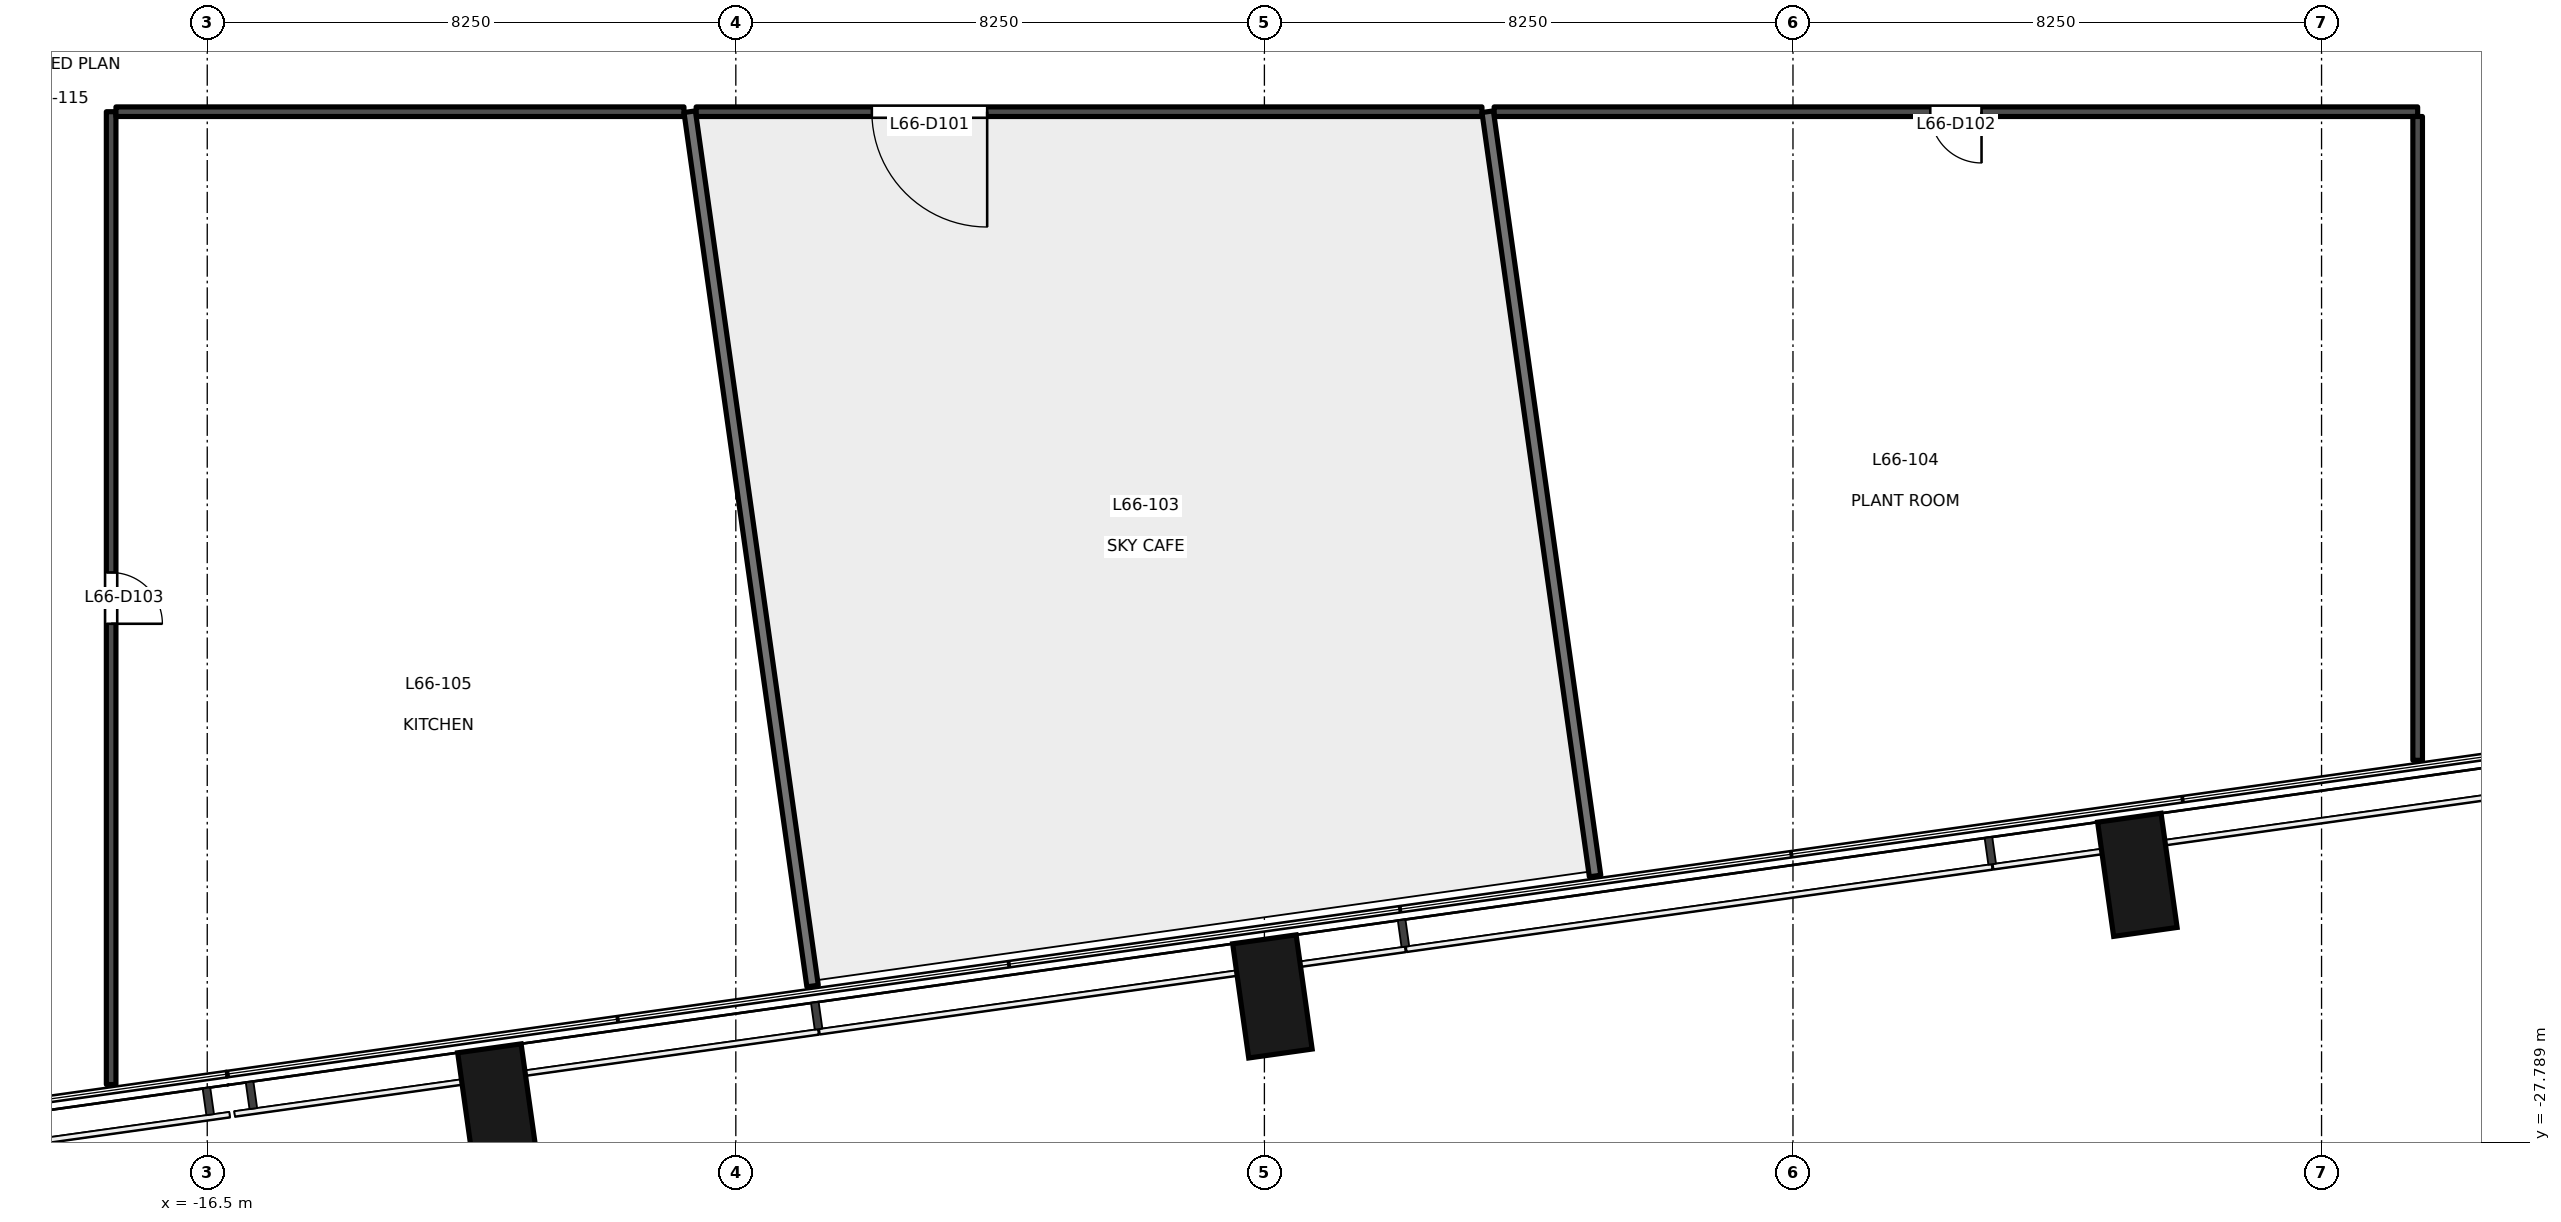
"""IFC4 building model, lengths in metres.
Left out: names, types, materials, properties, quantities, classifications, styles, units other than length and angle.
Written with IfcOpenShell. Run it as: python <this file> out.ifc"""

import sys

from ifc_helpers import new_model, si_unit, direction, frame, frame_2d, origin, origin_2d, place, context, subcontext, project, spatial, rectangle, extrude, element, fill, save


model = new_model("IFC4")
c1 = context("Model", 3, precision=1e-05, world=origin(), true_north=direction((0.0, 1.0)))
c2 = subcontext(c1, "Body", "Model", "MODEL_VIEW")
j1 = project(units=[si_unit("LENGTHUNIT", "METRE"), si_unit("PLANEANGLEUNIT", "RADIAN")], contexts=[c1])
p1 = place(None, origin())
s1 = spatial("IfcSite", under=j1, at=p1, CompositionType="ELEMENT")
p2 = place(p1, origin())
s2 = spatial("IfcBuilding", under=s1, at=p2, CompositionType="ELEMENT")
p3 = place(p2, frame((0.0, 0.0, 286.3)))
s3 = spatial("IfcBuildingStorey", under=s2, at=p3, CompositionType="ELEMENT", Elevation=286.3)
for number, where, z_axis, x_axis in (
    (1, (-11.971, -27.209, -0.2), (0.0, 0.0, 1.0), (0.99, 0.139, 0.0)),
    (2, (0.125, -25.508, -0.2), (0.0, 0.0, 1.0), (0.99, 0.139, 0.0)),
    (3, (13.625, -23.61, -0.2), (0.0, 0.0, 1.0), (0.99, 0.139, 0.0)),
):
    element("IfcColumn", number, at=place(p3, frame(where, z_axis=z_axis, x_axis=x_axis)), inside=s3, PredefinedType="COLUMN", context=c2, shape_type="SweptSolid", body=[
        extrude(rectangle(XDim=1.0, YDim=1.8, at=origin_2d()), origin(), (0.0, 0.0, 1.0), 6.0),
    ])
p4 = place(p3, frame((3.396, -11.7, 0.0), z_axis=(0.0, 0.0, 1.0), x_axis=(-1.0, 0.0, 0.0)))
e4 = element("IfcWall", 4, at=p4, inside=s3, PredefinedType="PARTITIONING", context=c2, shape_type="SweptSolid", body=[
    extrude(rectangle(XDim=12.265, YDim=0.15, at=frame_2d((6.132, 0.0))), origin(), (0.0, 0.0, 1.0), 3.75),
])
p5 = place(p4, frame((7.723, 0.0, 0.0)))
e5 = element("IfcOpeningElement", 5, at=p5, cuts=e4, PredefinedType="OPENING", context=c2, shape_type="SweptSolid", body=[
    extrude(rectangle(XDim=1.8, YDim=2.1, at=frame_2d((0.9, 1.05))), frame((0.0, 0.085, 0.0), z_axis=(0.0, -1.0, 0.0), x_axis=(1.0, 0.0, 0.0)), (0.0, 0.0, 1.0), 0.171),
])
p6 = place(p3, frame((18.0, -11.7, 0.0), z_axis=(0.0, 0.0, 1.0), x_axis=(-1.0, 0.0, 0.0)))
e6 = element("IfcWall", 6, at=p6, inside=s3, PredefinedType="PARTITIONING", context=c2, shape_type="SweptSolid", body=[
    extrude(rectangle(XDim=14.414, YDim=0.15, at=frame_2d((7.207, 0.0))), origin(), (0.0, 0.0, 1.0), 3.75),
])
p7 = place(p6, frame((6.807, 0.0, 0.0)))
e7 = element("IfcOpeningElement", 7, at=p7, cuts=e6, PredefinedType="OPENING", context=c2, shape_type="SweptSolid", body=[
    extrude(rectangle(XDim=0.8, YDim=2.1, at=frame_2d((0.4, 1.05))), frame((0.0, 0.085, 0.0), z_axis=(0.0, -1.0, 0.0), x_axis=(1.0, 0.0, 0.0)), (0.0, 0.0, 1.0), 0.171),
])
p8 = place(p3, frame((18.0, -21.823, 0.0), z_axis=(0.0, 0.0, 1.0), x_axis=(0.0, 1.0, 0.0)))
e8 = element("IfcWall", 8, at=p8, inside=s3, PredefinedType="PARTITIONING", context=c2, shape_type="SweptSolid", body=[
    extrude(rectangle(XDim=10.048, YDim=0.15, at=frame_2d((5.024, 0.0))), origin(), (0.0, 0.0, 1.0), 5.8),
])
p9 = place(p3, frame((-18.0, -11.7, 0.0), z_axis=(0.0, 0.0, 1.0), x_axis=(0.0, -1.0, 0.0)))
e9 = element("IfcWall", 9, at=p9, inside=s3, PredefinedType="PARTITIONING", context=c2, shape_type="SweptSolid", body=[
    extrude(rectangle(XDim=15.183, YDim=0.15, at=frame_2d((7.592, 0.0))), origin(), (0.0, 0.0, 1.0), 3.75),
])
p10 = place(p9, frame((7.192, 0.0, 0.0)))
e10 = element("IfcOpeningElement", 10, at=p10, cuts=e9, PredefinedType="OPENING", context=c2, shape_type="SweptSolid", body=[
    extrude(rectangle(XDim=0.8, YDim=2.1, at=frame_2d((0.4, 1.05))), frame((0.0, 0.085, 0.0), z_axis=(0.0, -1.0, 0.0), x_axis=(1.0, 0.0, 0.0)), (0.0, 0.0, 1.0), 0.171),
])
p11 = place(p3, frame((-9.059, -11.7, 0.0), z_axis=(0.0, 0.0, 1.0), x_axis=(-1.0, 0.0, 0.0)))
e11 = element("IfcWall", 11, at=p11, inside=s3, PredefinedType="PARTITIONING", context=c2, shape_type="SweptSolid", body=[
    extrude(rectangle(XDim=8.866, YDim=0.15, at=frame_2d((4.433, 0.0))), origin(), (0.0, 0.0, 1.0), 3.75),
])
p12 = place(p3, frame((3.485, -11.7, 0.0), z_axis=(0.0, 0.0, 1.0), x_axis=(0.139114157963, -0.990276350851, 0.0)))
e12 = element("IfcWall", 12, at=p12, inside=s3, PredefinedType="PARTITIONING", context=c2, shape_type="SweptSolid", body=[
    extrude(rectangle(XDim=12.046, YDim=0.18, at=frame_2d((6.023, 0.0))), origin(), (0.0, 0.0, 1.0), 4.7),
])
p13 = place(p3, frame((-7.052, -25.346, 0.0), z_axis=(0.0, 0.0, 1.0), x_axis=(-0.139183709079, 0.99026657781, 0.0)))
e13 = element("IfcWall", 13, at=p13, inside=s3, PredefinedType="PARTITIONING", context=c2, shape_type="SweptSolid", body=[
    extrude(rectangle(XDim=13.78, YDim=0.18, at=frame_2d((6.89, 0.0))), origin(), (0.0, 0.0, 1.0), 4.7),
])
p14 = place(p5, origin())
e14 = element("IfcDoor", 14, at=p14, inside=s3, OperationType="DOUBLE_DOOR_SINGLE_SWING", PredefinedType="DOOR", context=c2, shape_type="SweptSolid", body=[
    extrude(rectangle(XDim=1.8, YDim=2.1, at=frame_2d((0.9, 1.05))), frame((0.0, 0.025, 0.0), z_axis=(0.0, -1.0, 0.0), x_axis=(1.0, 0.0, 0.0)), (0.0, 0.0, 1.0), 0.05),
])
fill(e5, e14)
p15 = place(p7, origin())
e15 = element("IfcDoor", 15, at=p15, inside=s3, OperationType="SINGLE_SWING_LEFT", PredefinedType="DOOR", context=c2, shape_type="SweptSolid", body=[
    extrude(rectangle(XDim=0.8, YDim=2.1, at=frame_2d((0.4, 1.05))), frame((0.0, 0.025, 0.0), z_axis=(0.0, -1.0, 0.0), x_axis=(1.0, 0.0, 0.0)), (0.0, 0.0, 1.0), 0.05),
])
fill(e7, e15)
p16 = place(p10, origin())
e16 = element("IfcDoor", 16, at=p16, inside=s3, OperationType="SINGLE_SWING_RIGHT", PredefinedType="DOOR", context=c2, shape_type="SweptSolid", body=[
    extrude(rectangle(XDim=0.8, YDim=2.1, at=frame_2d((0.4, 1.05))), frame((0.0, 0.025, 0.0), z_axis=(0.0, -1.0, 0.0), x_axis=(1.0, 0.0, 0.0)), (0.0, 0.0, 1.0), 0.05),
])
fill(e10, e16)
save(model, sys.argv[1])
